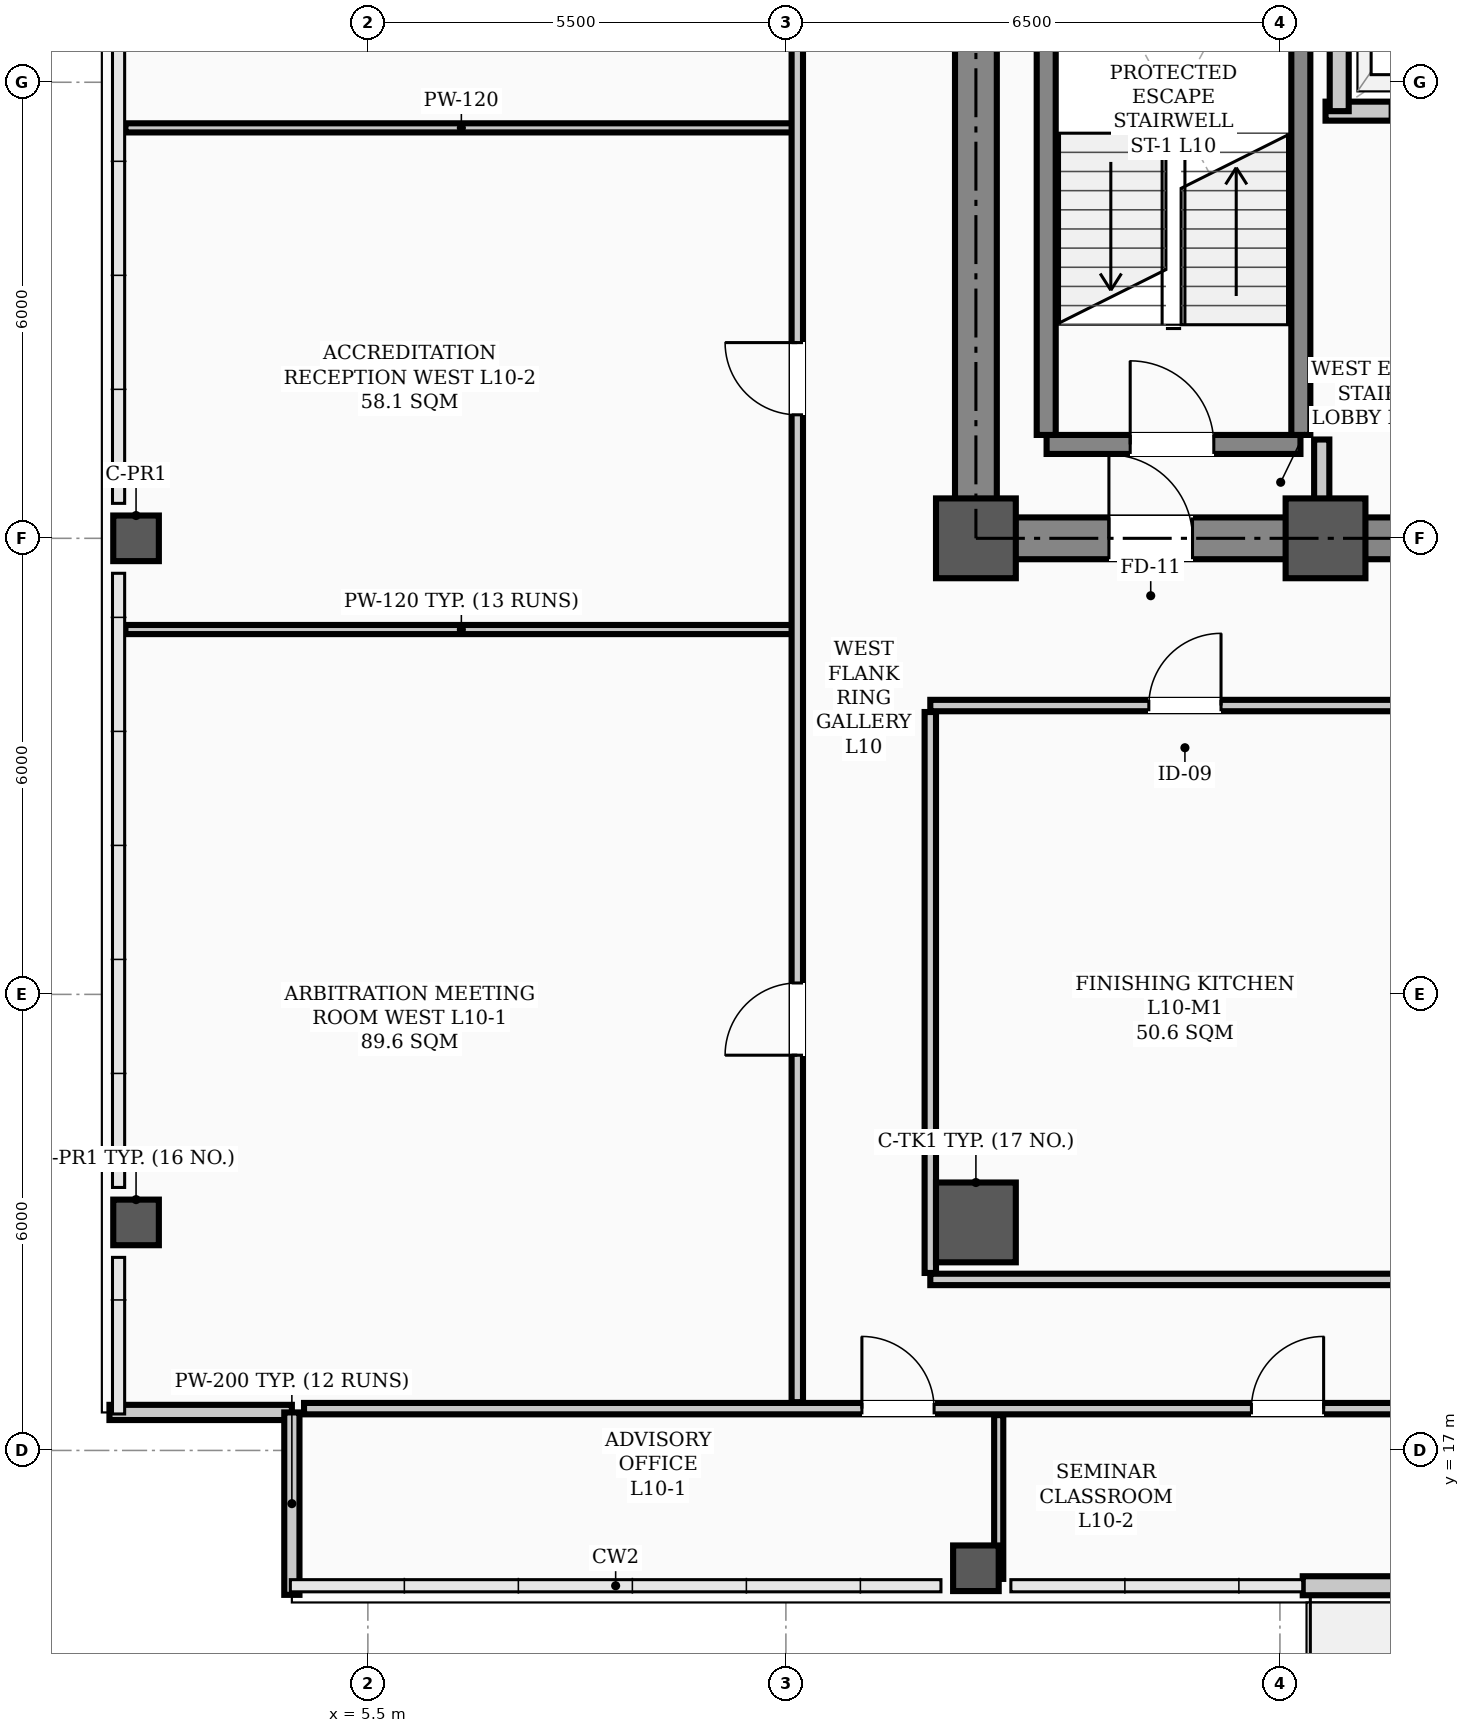
"""IFC4 building model, lengths in metres.
Left out: names, types, materials, properties, quantities, classifications, styles, units other than length and angle.
Written with IfcOpenShell. Run it as: python <this file> out.ifc"""

import sys

from ifc_helpers import new_model, si_unit, direction, frame, frame_2d, origin, origin_2d, place, context, subcontext, project, spatial, rectangle, hollow_rectangle, extrude, element, fill, save


model = new_model("IFC4")
c1 = context("Model", 3, precision=1e-05, world=origin(), true_north=direction((0.0, 1.0)))
c2 = subcontext(c1, "Body", "Model", "MODEL_VIEW")
j1 = project(units=[si_unit("LENGTHUNIT", "METRE"), si_unit("PLANEANGLEUNIT", "RADIAN")], contexts=[c1])
p1 = place(None, origin())
s1 = spatial("IfcSite", under=j1, at=p1, CompositionType="ELEMENT")
p2 = place(p1, origin())
s2 = spatial("IfcBuilding", under=s1, at=p2, CompositionType="ELEMENT")
p3 = place(p2, frame((0.0, 0.0, 42.1)))
s3 = spatial("IfcBuildingStorey", under=s2, at=p3, CompositionType="ELEMENT", Elevation=42.1)
for number, where, z_axis, x_axis in (
    (1, (13.5, 29.0, 0.0), (0.0, 0.0, 1.0), (1.0, 0.0, 0.0)),
    (2, (18.1, 29.0, 0.0), (0.0, 0.0, 1.0), (1.0, 0.0, 0.0)),
    (3, (13.5, 20.0, 0.0), (0.0, 0.0, 1.0), (1.0, 0.0, 0.0)),
):
    element("IfcColumn", number, at=place(p3, frame(where, z_axis=z_axis, x_axis=x_axis)), inside=s3, PredefinedType="COLUMN", context=c2, shape_type="SweptSolid", body=[
        extrude(hollow_rectangle(XDim=1.05, YDim=1.05, WallThickness=0.038, InnerFilletRadius=0.019, OuterFilletRadius=0.057, at=origin_2d()), origin(), (0.0, 0.0, 1.0), 3.9),
    ])
for number, where, z_axis, x_axis in (
    (4, (2.45, 20.0, 0.0), (0.0, 0.0, 1.0), (1.0, 0.0, 0.0)),
    (5, (2.45, 29.0, 0.0), (0.0, 0.0, 1.0), (1.0, 0.0, 0.0)),
    (6, (13.5, 15.45, 0.0), (0.0, 0.0, 1.0), (1.0, 0.0, 0.0)),
):
    element("IfcColumn", number, at=place(p3, frame(where, z_axis=z_axis, x_axis=x_axis)), inside=s3, PredefinedType="COLUMN", context=c2, shape_type="SweptSolid", body=[
        extrude(hollow_rectangle(XDim=0.6, YDim=0.6, WallThickness=0.026, InnerFilletRadius=0.013, OuterFilletRadius=0.039, at=origin_2d()), origin(), (0.0, 0.0, 1.0), 3.9),
    ])
for number, where, z_axis, x_axis in (
    (7, (2.1, 17.5, 0.0), (0.0, 0.0, 1.0), (1.0, 0.0, 0.0)),
    (8, (4.5, 17.5, 0.0), (0.0, 0.0, 1.0), (0.0, -1.0, 0.0)),
):
    element("IfcWall", number, at=place(p3, frame(where, z_axis=z_axis, x_axis=x_axis)), inside=s3, PredefinedType="PARAPET", context=c2, shape_type="SweptSolid", body=[
        extrude(rectangle(XDim=2.4, YDim=0.2, at=frame_2d((1.2, 0.0))), origin(), (0.0, 0.0, 1.0), 1.2),
    ])
p4 = place(p3, frame((17.8, 15.22, 0.0), z_axis=(0.0, 0.0, 1.0), x_axis=(1.0, 0.0, 0.0)))
e9 = element("IfcWall", 9, at=p4, inside=s3, PredefinedType="STANDARD", context=c2, shape_type="SweptSolid", body=[
    extrude(rectangle(XDim=3.7, YDim=0.25, at=frame_2d((1.85, 0.0))), origin(), (0.0, 0.0, 1.0), 3.18),
])
p5 = place(p4, frame((1.3, 0.0, 0.0)))
e10 = element("IfcOpeningElement", 10, at=p5, cuts=e9, PredefinedType="OPENING", context=c2, shape_type="SweptSolid", body=[
    extrude(rectangle(XDim=1.1, YDim=2.2, at=frame_2d((0.55, 1.1))), frame((0.0, 0.135, 0.0), z_axis=(0.0, -1.0, 0.0), x_axis=(1.0, 0.0, 0.0)), (0.0, 0.0, 1.0), 0.27),
])
p6 = place(p3, frame((13.5, 29.0, 0.0), z_axis=(0.0, 0.0, 1.0), x_axis=(1.0, 0.0, 0.0)))
e11 = element("IfcWall", 11, at=p6, inside=s3, PredefinedType="SHEAR", context=c2, shape_type="SweptSolid", body=[
    extrude(rectangle(XDim=30.5, YDim=0.55, at=frame_2d((15.25, 0.0))), origin(), (0.0, 0.0, 1.0), 3.72),
])
p7 = place(p6, frame((1.75, 0.0, 0.0)))
e12 = element("IfcOpeningElement", 12, at=p7, cuts=e11, PredefinedType="OPENING", context=c2, shape_type="SweptSolid", body=[
    extrude(rectangle(XDim=1.1, YDim=2.08, at=frame_2d((0.55, 1.04))), frame((0.0, 0.285, 0.0), z_axis=(0.0, -1.0, 0.0), x_axis=(1.0, 0.0, 0.0)), (0.0, 0.0, 1.0), 0.57),
])
p8 = place(p6, frame((26.7, 0.0, 0.0)))
e13 = element("IfcOpeningElement", 13, at=p8, cuts=e11, PredefinedType="OPENING", context=c2, shape_type="SweptSolid", body=[
    extrude(rectangle(XDim=1.1, YDim=2.08, at=frame_2d((0.55, 1.04))), frame((0.0, 0.285, 0.0), z_axis=(0.0, -1.0, 0.0), x_axis=(1.0, 0.0, 0.0)), (0.0, 0.0, 1.0), 0.57),
])
p9 = place(p6, frame((6.8, 0.0, 0.0)))
e14 = element("IfcOpeningElement", 14, at=p9, cuts=e11, PredefinedType="OPENING", context=c2, shape_type="SweptSolid", body=[
    extrude(rectangle(XDim=1.1, YDim=2.08, at=frame_2d((0.55, 1.04))), frame((0.0, 0.285, 0.0), z_axis=(0.0, -1.0, 0.0), x_axis=(1.0, 0.0, 0.0)), (0.0, 0.0, 1.0), 0.57),
])
p10 = place(p6, frame((13.2, 0.0, 0.0)))
e15 = element("IfcOpeningElement", 15, at=p10, cuts=e11, PredefinedType="OPENING", context=c2, shape_type="SweptSolid", body=[
    extrude(rectangle(XDim=1.6, YDim=2.08, at=frame_2d((0.8, 1.04))), frame((0.0, 0.285, 0.0), z_axis=(0.0, -1.0, 0.0), x_axis=(1.0, 0.0, 0.0)), (0.0, 0.0, 1.0), 0.57),
])
p11 = place(p6, frame((20.525, 0.0, 0.0)))
e16 = element("IfcOpeningElement", 16, at=p11, cuts=e11, PredefinedType="OPENING", context=c2, shape_type="SweptSolid", body=[
    extrude(rectangle(XDim=0.95, YDim=2.08, at=frame_2d((0.475, 1.04))), frame((0.0, 0.285, 0.0), z_axis=(0.0, -1.0, 0.0), x_axis=(1.0, 0.0, 0.0)), (0.0, 0.0, 1.0), 0.57),
])
p12 = place(p3, frame((13.5, 29.35, 0.0), z_axis=(0.0, 0.0, 1.0), x_axis=(0.0, 1.0, 0.0)))
e17 = element("IfcWall", 17, at=p12, inside=s3, PredefinedType="SHEAR", context=c2, shape_type="SweptSolid", body=[
    extrude(rectangle(XDim=8.6, YDim=0.55, at=frame_2d((4.3, 0.0))), origin(), (0.0, 0.0, 1.0), 3.72),
])
p13 = place(p3, frame((14.43, 30.235, 0.0), z_axis=(0.0, 0.0, 1.0), x_axis=(1.0, 0.0, 0.0)))
e18 = element("IfcWall", 18, at=p13, inside=s3, PredefinedType="STANDARD", context=c2, shape_type="SweptSolid", body=[
    extrude(rectangle(XDim=3.34, YDim=0.25, at=frame_2d((1.67, 0.0))), origin(), (0.0, 0.0, 1.0), 3.72),
])
p14 = place(p13, frame((1.1, 0.0, 0.0)))
e19 = element("IfcOpeningElement", 19, at=p14, cuts=e18, PredefinedType="OPENING", context=c2, shape_type="SweptSolid", body=[
    extrude(rectangle(XDim=1.1, YDim=2.08, at=frame_2d((0.55, 1.04))), frame((0.0, 0.135, 0.0), z_axis=(0.0, -1.0, 0.0), x_axis=(1.0, 0.0, 0.0)), (0.0, 0.0, 1.0), 0.27),
])
for number, where, z_axis, x_axis in (
    (20, (14.425, 30.36, 0.0), (0.0, 0.0, 1.0), (0.0, 1.0, 0.0)),
    (21, (17.775, 30.36, 0.0), (0.0, 0.0, 1.0), (0.0, 1.0, 0.0)),
):
    element("IfcWall", number, at=place(p3, frame(where, z_axis=z_axis, x_axis=x_axis)), inside=s3, PredefinedType="STANDARD", context=c2, shape_type="SweptSolid", body=[
        extrude(rectangle(XDim=7.184, YDim=0.25, at=frame_2d((3.592, 0.0))), origin(), (0.0, 0.0, 1.0), 3.72),
    ])
p15 = place(p3, frame((18.1, 34.62, 0.0), z_axis=(0.0, 0.0, 1.0), x_axis=(1.0, 0.0, 0.0)))
e22 = element("IfcWall", 22, at=p15, inside=s3, PredefinedType="STANDARD", context=c2, shape_type="SweptSolid", body=[
    extrude(rectangle(XDim=5.35, YDim=0.25, at=frame_2d((2.675, 0.0))), origin(), (0.0, 0.0, 1.0), 3.72),
])
p16 = place(p15, frame((0.85, 0.0, 0.0)))
e23 = element("IfcOpeningElement", 23, at=p16, cuts=e22, PredefinedType="OPENING", context=c2, shape_type="SweptSolid", body=[
    extrude(rectangle(XDim=1.1, YDim=2.08, at=frame_2d((0.55, 1.04))), frame((0.0, 0.135, 0.0), z_axis=(0.0, -1.0, 0.0), x_axis=(1.0, 0.0, 0.0)), (0.0, 0.0, 1.0), 0.27),
])
p17 = place(p15, frame((3.45, 0.0, 0.0)))
e24 = element("IfcOpeningElement", 24, at=p17, cuts=e22, PredefinedType="OPENING", context=c2, shape_type="SweptSolid", body=[
    extrude(rectangle(XDim=1.1, YDim=2.08, at=frame_2d((0.55, 1.04))), frame((0.0, 0.135, 0.0), z_axis=(0.0, -1.0, 0.0), x_axis=(1.0, 0.0, 0.0)), (0.0, 0.0, 1.0), 0.27),
])
p18 = place(p3, frame((18.28, 34.62, 0.0), z_axis=(0.0, 0.0, 1.0), x_axis=(0.0, 1.0, 0.0)))
e25 = element("IfcWall", 25, at=p18, inside=s3, PredefinedType="STANDARD", context=c2, shape_type="SweptSolid", body=[
    extrude(rectangle(XDim=3.33, YDim=0.25, at=frame_2d((1.665, 0.0))), origin(), (0.0, 0.0, 1.0), 3.3),
])
p19 = place(p3, frame((12.9, 26.8, 0.0), z_axis=(0.0, 0.0, 1.0), x_axis=(1.0, 0.0, 0.0)))
e26 = element("IfcWall", 26, at=p19, inside=s3, PredefinedType="PARTITIONING", context=c2, shape_type="SweptSolid", body=[
    extrude(rectangle(XDim=31.7, YDim=0.15, at=frame_2d((15.85, 0.0))), origin(), (0.0, 0.0, 1.0), 3.1),
])
p20 = place(p19, frame((13.6, 0.0, 0.0)))
e27 = element("IfcOpeningElement", 27, at=p20, cuts=e26, PredefinedType="OPENING", context=c2, shape_type="SweptSolid", body=[
    extrude(rectangle(XDim=1.6, YDim=2.08, at=frame_2d((0.8, 1.04))), frame((0.0, 0.085, 0.0), z_axis=(0.0, -1.0, 0.0), x_axis=(1.0, 0.0, 0.0)), (0.0, 0.0, 1.0), 0.17),
])
p21 = place(p19, frame((2.875, 0.0, 0.0)))
e28 = element("IfcOpeningElement", 28, at=p21, cuts=e26, PredefinedType="OPENING", context=c2, shape_type="SweptSolid", body=[
    extrude(rectangle(XDim=0.95, YDim=2.08, at=frame_2d((0.475, 1.04))), frame((0.0, 0.085, 0.0), z_axis=(0.0, -1.0, 0.0), x_axis=(1.0, 0.0, 0.0)), (0.0, 0.0, 1.0), 0.17),
])
p22 = place(p19, frame((8.625, 0.0, 0.0)))
e29 = element("IfcOpeningElement", 29, at=p22, cuts=e26, PredefinedType="OPENING", context=c2, shape_type="SweptSolid", body=[
    extrude(rectangle(XDim=0.95, YDim=2.08, at=frame_2d((0.475, 1.04))), frame((0.0, 0.085, 0.0), z_axis=(0.0, -1.0, 0.0), x_axis=(1.0, 0.0, 0.0)), (0.0, 0.0, 1.0), 0.17),
])
p23 = place(p19, frame((16.075, 0.0, 0.0)))
e30 = element("IfcOpeningElement", 30, at=p23, cuts=e26, PredefinedType="OPENING", context=c2, shape_type="SweptSolid", body=[
    extrude(rectangle(XDim=0.95, YDim=2.08, at=frame_2d((0.475, 1.04))), frame((0.0, 0.085, 0.0), z_axis=(0.0, -1.0, 0.0), x_axis=(1.0, 0.0, 0.0)), (0.0, 0.0, 1.0), 0.17),
])
p24 = place(p19, frame((21.875, 0.0, 0.0)))
e31 = element("IfcOpeningElement", 31, at=p24, cuts=e26, PredefinedType="OPENING", context=c2, shape_type="SweptSolid", body=[
    extrude(rectangle(XDim=0.95, YDim=2.08, at=frame_2d((0.475, 1.04))), frame((0.0, 0.085, 0.0), z_axis=(0.0, -1.0, 0.0), x_axis=(1.0, 0.0, 0.0)), (0.0, 0.0, 1.0), 0.17),
])
p25 = place(p19, frame((29.025, 0.0, 0.0)))
e32 = element("IfcOpeningElement", 32, at=p25, cuts=e26, PredefinedType="OPENING", context=c2, shape_type="SweptSolid", body=[
    extrude(rectangle(XDim=0.95, YDim=2.08, at=frame_2d((0.475, 1.04))), frame((0.0, 0.085, 0.0), z_axis=(0.0, -1.0, 0.0), x_axis=(1.0, 0.0, 0.0)), (0.0, 0.0, 1.0), 0.17),
])
p26 = place(p3, frame((4.66, 17.55, 0.0), z_axis=(0.0, 0.0, 1.0), x_axis=(1.0, 0.0, 0.0)))
e33 = element("IfcWall", 33, at=p26, inside=s3, PredefinedType="PARTITIONING", context=c2, shape_type="SweptSolid", body=[
    extrude(rectangle(XDim=44.68, YDim=0.15, at=frame_2d((22.34, 0.0))), origin(), (0.0, 0.0, 1.0), 3.1),
])
p27 = place(p26, frame((7.34, 0.0, 0.0)))
e34 = element("IfcOpeningElement", 34, at=p27, cuts=e33, PredefinedType="OPENING", context=c2, shape_type="SweptSolid", body=[
    extrude(rectangle(XDim=0.95, YDim=2.08, at=frame_2d((0.475, 1.04))), frame((0.0, 0.085, 0.0), z_axis=(0.0, -1.0, 0.0), x_axis=(1.0, 0.0, 0.0)), (0.0, 0.0, 1.0), 0.17),
])
p28 = place(p26, frame((12.465, 0.0, 0.0)))
e35 = element("IfcOpeningElement", 35, at=p28, cuts=e33, PredefinedType="OPENING", context=c2, shape_type="SweptSolid", body=[
    extrude(rectangle(XDim=0.95, YDim=2.08, at=frame_2d((0.475, 1.04))), frame((0.0, 0.085, 0.0), z_axis=(0.0, -1.0, 0.0), x_axis=(1.0, 0.0, 0.0)), (0.0, 0.0, 1.0), 0.17),
])
p29 = place(p26, frame((29.265, 0.0, 0.0)))
e36 = element("IfcOpeningElement", 36, at=p29, cuts=e33, PredefinedType="OPENING", context=c2, shape_type="SweptSolid", body=[
    extrude(rectangle(XDim=0.95, YDim=2.08, at=frame_2d((0.475, 1.04))), frame((0.0, 0.085, 0.0), z_axis=(0.0, -1.0, 0.0), x_axis=(1.0, 0.0, 0.0)), (0.0, 0.0, 1.0), 0.17),
])
p30 = place(p26, frame((37.265, 0.0, 0.0)))
e37 = element("IfcOpeningElement", 37, at=p30, cuts=e33, PredefinedType="OPENING", context=c2, shape_type="SweptSolid", body=[
    extrude(rectangle(XDim=0.95, YDim=2.08, at=frame_2d((0.475, 1.04))), frame((0.0, 0.085, 0.0), z_axis=(0.0, -1.0, 0.0), x_axis=(1.0, 0.0, 0.0)), (0.0, 0.0, 1.0), 0.17),
])
p31 = place(p3, frame((12.9, 19.25, 0.0), z_axis=(0.0, 0.0, 1.0), x_axis=(1.0, 0.0, 0.0)))
e38 = element("IfcWall", 38, at=p31, inside=s3, PredefinedType="PARTITIONING", context=c2, shape_type="SweptSolid", body=[
    extrude(rectangle(XDim=13.3, YDim=0.15, at=frame_2d((6.65, 0.0))), origin(), (0.0, 0.0, 1.0), 3.1),
])
for number, where, z_axis, x_axis in (
    (39, (2.31, 27.8, 0.0), (0.0, 0.0, 1.0), (1.0, 0.0, 0.0)),
    (40, (2.31, 34.4, 0.0), (0.0, 0.0, 1.0), (1.0, 0.0, 0.0)),
):
    element("IfcWall", number, at=place(p3, frame(where, z_axis=z_axis, x_axis=x_axis)), inside=s3, PredefinedType="PARTITIONING", context=c2, shape_type="SweptSolid", body=[
        extrude(rectangle(XDim=8.84, YDim=0.12, at=frame_2d((4.42, 0.0))), origin(), (0.0, 0.0, 1.0), 3.212),
    ])
p32 = place(p3, frame((18.05, 29.285, 0.0), z_axis=(0.0, 0.0, 1.0), x_axis=(0.0, 1.0, 0.0)))
e41 = element("IfcWall", 41, at=p32, inside=s3, PredefinedType="STANDARD", context=c2, shape_type="SweptSolid", body=[
    extrude(rectangle(XDim=1.015, YDim=0.2, at=frame_2d((0.508, 0.0))), origin(), (0.0, 0.0, 1.0), 3.3),
])
p33 = place(p3, frame((11.15, 17.635, 0.0), z_axis=(0.0, 0.0, 1.0), x_axis=(0.0, 1.0, 0.0)))
e42 = element("IfcWall", 42, at=p33, inside=s3, PredefinedType="PARTITIONING", context=c2, shape_type="SweptSolid", body=[
    extrude(rectangle(XDim=22.53, YDim=0.15, at=frame_2d((11.265, 0.0))), origin(), (0.0, 0.0, 1.0), 3.0),
])
p34 = place(p33, frame((4.565, 0.0, 0.0)))
e43 = element("IfcOpeningElement", 43, at=p34, cuts=e42, PredefinedType="OPENING", context=c2, shape_type="SweptSolid", body=[
    extrude(rectangle(XDim=0.95, YDim=2.08, at=frame_2d((0.475, 1.04))), frame((0.0, 0.085, 0.0), z_axis=(0.0, -1.0, 0.0), x_axis=(1.0, 0.0, 0.0)), (0.0, 0.0, 1.0), 0.17),
])
p35 = place(p33, frame((12.99, 0.0, 0.0)))
e44 = element("IfcOpeningElement", 44, at=p35, cuts=e42, PredefinedType="OPENING", context=c2, shape_type="SweptSolid", body=[
    extrude(rectangle(XDim=0.95, YDim=2.08, at=frame_2d((0.475, 1.04))), frame((0.0, 0.085, 0.0), z_axis=(0.0, -1.0, 0.0), x_axis=(1.0, 0.0, 0.0)), (0.0, 0.0, 1.0), 0.17),
])
p36 = place(p33, frame((19.215, 0.0, 0.0)))
e45 = element("IfcOpeningElement", 45, at=p36, cuts=e42, PredefinedType="OPENING", context=c2, shape_type="SweptSolid", body=[
    extrude(rectangle(XDim=0.95, YDim=2.08, at=frame_2d((0.475, 1.04))), frame((0.0, 0.085, 0.0), z_axis=(0.0, -1.0, 0.0), x_axis=(1.0, 0.0, 0.0)), (0.0, 0.0, 1.0), 0.17),
])
p37 = place(p3, frame((12.9, 19.335, 0.0), z_axis=(0.0, 0.0, 1.0), x_axis=(0.0, 1.0, 0.0)))
e46 = element("IfcWall", 46, at=p37, inside=s3, PredefinedType="PARTITIONING", context=c2, shape_type="SweptSolid", body=[
    extrude(rectangle(XDim=7.38, YDim=0.15, at=frame_2d((3.69, 0.0))), origin(), (0.0, 0.0, 1.0), 3.0),
])
p38 = place(p3, frame((13.8, 15.31, 0.0), z_axis=(0.0, 0.0, 1.0), x_axis=(0.0, 1.0, 0.0)))
e47 = element("IfcWall", 47, at=p38, inside=s3, PredefinedType="PARTITIONING", context=c2, shape_type="SweptSolid", body=[
    extrude(rectangle(XDim=2.155, YDim=0.12, at=frame_2d((1.078, 0.0))), origin(), (0.0, 0.0, 1.0), 3.1),
])
p39 = place(p14, origin())
e48 = element("IfcDoor", 48, at=p39, inside=s3, OperationType="SINGLE_SWING_LEFT", PredefinedType="DOOR", context=c2, shape_type="SweptSolid", body=[
    extrude(rectangle(XDim=1.1, YDim=2.08, at=frame_2d((0.55, 1.04))), frame((0.0, 0.025, 0.0), z_axis=(0.0, -1.0, 0.0), x_axis=(1.0, 0.0, 0.0)), (0.0, 0.0, 1.0), 0.05),
])
fill(e19, e48)
p40 = place(p7, origin())
e49 = element("IfcDoor", 49, at=p40, inside=s3, OperationType="SINGLE_SWING_LEFT", PredefinedType="DOOR", context=c2, shape_type="SweptSolid", body=[
    extrude(rectangle(XDim=1.1, YDim=2.08, at=frame_2d((0.55, 1.04))), frame((0.0, 0.025, 0.0), z_axis=(0.0, -1.0, 0.0), x_axis=(1.0, 0.0, 0.0)), (0.0, 0.0, 1.0), 0.05),
])
fill(e12, e49)
p41 = place(p27, origin())
e50 = element("IfcDoor", 50, at=p41, inside=s3, OperationType="SINGLE_SWING_LEFT", PredefinedType="DOOR", context=c2, shape_type="SweptSolid", body=[
    extrude(rectangle(XDim=0.95, YDim=2.08, at=frame_2d((0.475, 1.04))), frame((0.0, 0.025, 0.0), z_axis=(0.0, -1.0, 0.0), x_axis=(1.0, 0.0, 0.0)), (0.0, 0.0, 1.0), 0.05),
])
fill(e34, e50)
p42 = place(p28, origin())
e51 = element("IfcDoor", 51, at=p42, inside=s3, OperationType="SINGLE_SWING_RIGHT", PredefinedType="DOOR", context=c2, shape_type="SweptSolid", body=[
    extrude(rectangle(XDim=0.95, YDim=2.08, at=frame_2d((0.475, 1.04))), frame((0.0, 0.025, 0.0), z_axis=(0.0, -1.0, 0.0), x_axis=(1.0, 0.0, 0.0)), (0.0, 0.0, 1.0), 0.05),
])
fill(e35, e51)
p43 = place(p21, origin())
e52 = element("IfcDoor", 52, at=p43, inside=s3, OperationType="SINGLE_SWING_RIGHT", PredefinedType="DOOR", context=c2, shape_type="SweptSolid", body=[
    extrude(rectangle(XDim=0.95, YDim=2.08, at=frame_2d((0.475, 1.04))), frame((0.0, 0.025, 0.0), z_axis=(0.0, -1.0, 0.0), x_axis=(1.0, 0.0, 0.0)), (0.0, 0.0, 1.0), 0.05),
])
fill(e28, e52)
p44 = place(p34, origin())
e53 = element("IfcDoor", 53, at=p44, inside=s3, OperationType="SINGLE_SWING_LEFT", PredefinedType="DOOR", context=c2, shape_type="SweptSolid", body=[
    extrude(rectangle(XDim=0.95, YDim=2.08, at=frame_2d((0.475, 1.04))), frame((0.0, 0.025, 0.0), z_axis=(0.0, -1.0, 0.0), x_axis=(1.0, 0.0, 0.0)), (0.0, 0.0, 1.0), 0.05),
])
fill(e43, e53)
p45 = place(p35, origin())
e54 = element("IfcDoor", 54, at=p45, inside=s3, OperationType="SINGLE_SWING_RIGHT", PredefinedType="DOOR", context=c2, shape_type="SweptSolid", body=[
    extrude(rectangle(XDim=0.95, YDim=2.08, at=frame_2d((0.475, 1.04))), frame((0.0, 0.025, 0.0), z_axis=(0.0, -1.0, 0.0), x_axis=(1.0, 0.0, 0.0)), (0.0, 0.0, 1.0), 0.05),
])
fill(e44, e54)
save(model, sys.argv[1])
